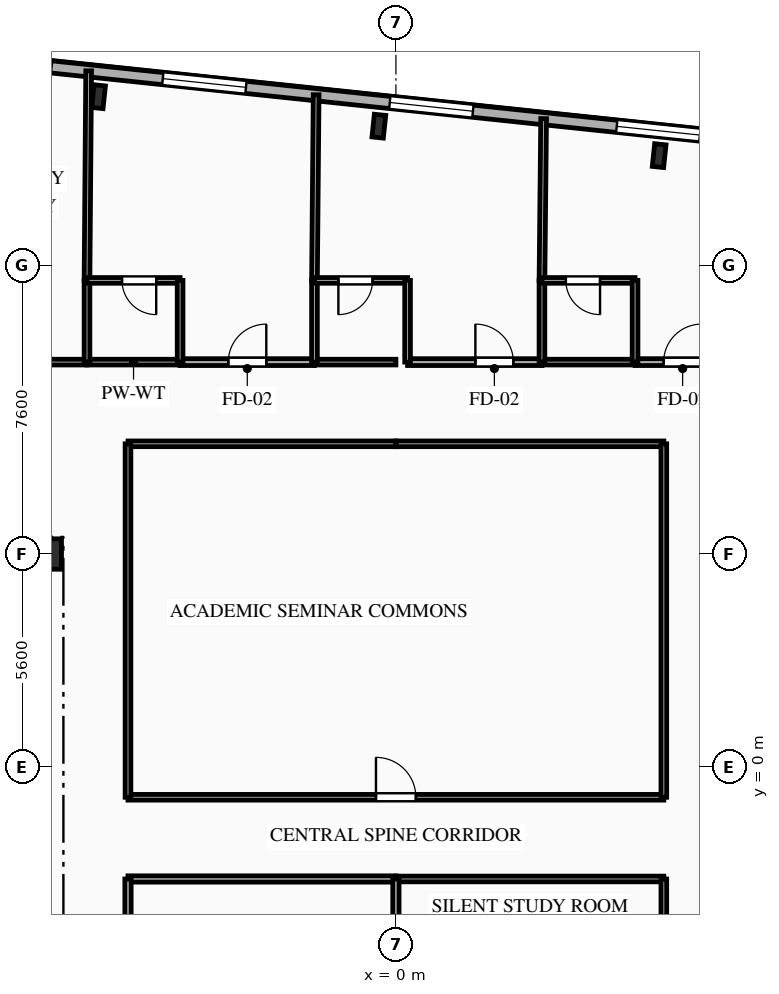
"""IFC4 building model, lengths in metres.
Left out: names, types, materials, properties, quantities, classifications, styles, units other than length and angle.
Written with IfcOpenShell. Run it as: python <this file> out.ifc"""

import sys

from ifc_helpers import new_model, si_unit, direction, frame, frame_2d, origin, origin_2d, place, context, subcontext, project, spatial, rectangle, i_section, extrude, element, fill, save


model = new_model("IFC4")
c1 = context("Model", 3, precision=1e-05, world=origin(), true_north=direction((0.0, 1.0)))
c2 = subcontext(c1, "Body", "Model", "MODEL_VIEW")
j1 = project(units=[si_unit("LENGTHUNIT", "METRE"), si_unit("PLANEANGLEUNIT", "RADIAN")], contexts=[c1])
p1 = place(None, origin())
s1 = spatial("IfcSite", under=j1, at=p1, CompositionType="ELEMENT")
p2 = place(p1, origin())
s2 = spatial("IfcBuilding", under=s1, at=p2, CompositionType="ELEMENT")
p3 = place(p2, frame((0.0, 0.0, 189.7)))
s3 = spatial("IfcBuildingStorey", under=s2, at=p3, CompositionType="ELEMENT", Elevation=189.7)
p4 = place(p3, frame((-9.2, 5.6, 0.0), z_axis=(0.0, 0.0, 1.0), x_axis=(1.0, 0.0, 0.0)))
e1 = element("IfcColumn", 1, at=p4, inside=s3, PredefinedType="COLUMN", context=c2, shape_type="SweptSolid", body=[
    extrude(rectangle(XDim=0.8, YDim=0.8, at=origin_2d()), origin(), (0.0, 0.0, 1.0), 3.35),
])
for number, where, z_axis, x_axis in (
    (2, (6.927, 16.083, 0.0), (0.0, 0.0, 1.0), (0.995, -0.105, 0.0)),
    (3, (-0.449, 16.858, 0.0), (0.0, 0.0, 1.0), (0.995, -0.105, 0.0)),
    (4, (-7.825, 17.634, 0.0), (0.0, 0.0, 1.0), (0.995, -0.105, 0.0)),
):
    element("IfcColumn", number, at=place(p3, frame(where, z_axis=z_axis, x_axis=x_axis)), inside=s3, PredefinedType="COLUMN", context=c2, shape_type="SweptSolid", body=[
        extrude(i_section(OverallWidth=0.3, OverallDepth=0.6, WebThickness=0.015, FlangeThickness=0.03, FilletRadius=0.027, at=origin_2d()), origin(), (0.0, 0.0, 1.0), 3.35),
    ])
p5 = place(p3, frame((-23.156, 19.898, 0.0), z_axis=(0.0, 0.0, 1.0), x_axis=(0.994522001802, -0.104527450613, 0.0)))
e5 = element("IfcWall", 5, at=p5, inside=s3, PredefinedType="SOLIDWALL", context=c2, shape_type="SweptSolid", body=[
    extrude(rectangle(XDim=45.8, YDim=0.32, at=frame_2d((22.9, 0.0))), origin(), (0.0, 0.0, 1.0), 3.04),
])
p6 = place(p5, frame((4.94, 0.0, 0.85)))
e6 = element("IfcOpeningElement", 6, at=p6, cuts=e5, PredefinedType="OPENING", context=c2, shape_type="SweptSolid", body=[
    extrude(rectangle(XDim=1.65, YDim=1.85, at=frame_2d((0.825, 0.925))), frame((0.0, 0.17, 0.0), z_axis=(0.0, -1.0, 0.0), x_axis=(1.0, 0.0, 0.0)), (0.0, 0.0, 1.0), 0.34),
])
p7 = place(p5, frame((12.572, 0.0, 0.85)))
e7 = element("IfcOpeningElement", 7, at=p7, cuts=e5, PredefinedType="OPENING", context=c2, shape_type="SweptSolid", body=[
    extrude(rectangle(XDim=1.6, YDim=1.85, at=frame_2d((0.8, 0.925))), frame((0.0, 0.17, 0.0), z_axis=(0.0, -1.0, 0.0), x_axis=(1.0, 0.0, 0.0)), (0.0, 0.0, 1.0), 0.34),
])
p8 = place(p5, frame((17.116, 0.0, 0.85)))
e8 = element("IfcOpeningElement", 8, at=p8, cuts=e5, PredefinedType="OPENING", context=c2, shape_type="SweptSolid", body=[
    extrude(rectangle(XDim=2.2, YDim=1.85, at=frame_2d((1.1, 0.925))), frame((0.0, 0.17, 0.0), z_axis=(0.0, -1.0, 0.0), x_axis=(1.0, 0.0, 0.0)), (0.0, 0.0, 1.0), 0.34),
])
p9 = place(p5, frame((23.121, 0.0, 0.85)))
e9 = element("IfcOpeningElement", 9, at=p9, cuts=e5, PredefinedType="OPENING", context=c2, shape_type="SweptSolid", body=[
    extrude(rectangle(XDim=2.2, YDim=1.85, at=frame_2d((1.1, 0.925))), frame((0.0, 0.17, 0.0), z_axis=(0.0, -1.0, 0.0), x_axis=(1.0, 0.0, 0.0)), (0.0, 0.0, 1.0), 0.34),
])
p10 = place(p5, frame((29.126, 0.0, 0.85)))
e10 = element("IfcOpeningElement", 10, at=p10, cuts=e5, PredefinedType="OPENING", context=c2, shape_type="SweptSolid", body=[
    extrude(rectangle(XDim=2.2, YDim=1.85, at=frame_2d((1.1, 0.925))), frame((0.0, 0.17, 0.0), z_axis=(0.0, -1.0, 0.0), x_axis=(1.0, 0.0, 0.0)), (0.0, 0.0, 1.0), 0.34),
])
p11 = place(p5, frame((35.172, 0.0, 0.85)))
e11 = element("IfcOpeningElement", 11, at=p11, cuts=e5, PredefinedType="OPENING", context=c2, shape_type="SweptSolid", body=[
    extrude(rectangle(XDim=2.2, YDim=1.85, at=frame_2d((1.1, 0.925))), frame((0.0, 0.17, 0.0), z_axis=(0.0, -1.0, 0.0), x_axis=(1.0, 0.0, 0.0)), (0.0, 0.0, 1.0), 0.34),
])
p12 = place(p5, frame((41.052, 0.0, 0.85)))
e12 = element("IfcOpeningElement", 12, at=p12, cuts=e5, PredefinedType="OPENING", context=c2, shape_type="SweptSolid", body=[
    extrude(rectangle(XDim=1.65, YDim=1.85, at=frame_2d((0.825, 0.925))), frame((0.0, 0.17, 0.0), z_axis=(0.0, -1.0, 0.0), x_axis=(1.0, 0.0, 0.0)), (0.0, 0.0, 1.0), 0.34),
])
p13 = place(p3, frame((-11.764, 10.65, 0.0), z_axis=(0.0, 0.0, 1.0), x_axis=(1.0, 0.0, 0.0)))
e13 = element("IfcWall", 13, at=p13, inside=s3, PredefinedType="PARTITIONING", context=c2, shape_type="SweptSolid", body=[
    extrude(rectangle(XDim=3.635, YDim=0.15, at=frame_2d((1.817, 0.0))), origin(), (0.0, 0.0, 1.0), 3.04),
])
p14 = place(p13, frame((0.771, 0.0, 0.0)))
e14 = element("IfcOpeningElement", 14, at=p14, cuts=e13, PredefinedType="OPENING", context=c2, shape_type="SweptSolid", body=[
    extrude(rectangle(XDim=0.95, YDim=2.1, at=frame_2d((0.475, 1.05))), frame((0.0, 0.085, 0.0), z_axis=(0.0, -1.0, 0.0), x_axis=(1.0, 0.0, 0.0)), (0.0, 0.0, 1.0), 0.17),
])
p15 = place(p3, frame((-5.679, 10.65, 0.0), z_axis=(0.0, 0.0, 1.0), x_axis=(1.0, 0.0, 0.0)))
e15 = element("IfcWall", 15, at=p15, inside=s3, PredefinedType="PARTITIONING", context=c2, shape_type="SweptSolid", body=[
    extrude(rectangle(XDim=3.536, YDim=0.18, at=frame_2d((1.768, 0.0))), origin(), (0.0, 0.0, 1.0), 3.04),
])
p16 = place(p15, frame((1.268, 0.0, 0.0)))
e16 = element("IfcOpeningElement", 16, at=p16, cuts=e15, PredefinedType="OPENING", context=c2, shape_type="SweptSolid", body=[
    extrude(rectangle(XDim=1.0, YDim=2.15, at=frame_2d((0.5, 1.075))), frame((0.0, 0.1, 0.0), z_axis=(0.0, -1.0, 0.0), x_axis=(1.0, 0.0, 0.0)), (0.0, 0.0, 1.0), 0.2),
])
p17 = place(p3, frame((-8.129, 10.65, 0.0), z_axis=(0.0, 0.0, 1.0), x_axis=(1.0, 0.0, 0.0)))
e17 = element("IfcWall", 17, at=p17, inside=s3, PredefinedType="PLUMBINGWALL", context=c2, shape_type="SweptSolid", body=[
    extrude(rectangle(XDim=2.45, YDim=0.15, at=frame_2d((1.225, 0.0))), origin(), (0.0, 0.0, 1.0), 3.04),
])
p18 = place(p3, frame((-2.143, 10.65, 0.0), z_axis=(0.0, 0.0, 1.0), x_axis=(1.0, 0.0, 0.0)))
e18 = element("IfcWall", 18, at=p18, inside=s3, PredefinedType="PLUMBINGWALL", context=c2, shape_type="SweptSolid", body=[
    extrude(rectangle(XDim=2.143, YDim=0.15, at=frame_2d((1.072, 0.0))), origin(), (0.0, 0.0, 1.0), 3.04),
])
p19 = place(p3, frame((0.0, 8.5, 0.0), z_axis=(0.0, 0.0, 1.0), x_axis=(-1.0, 0.0, 0.0)))
e19 = element("IfcWall", 19, at=p19, inside=s3, PredefinedType="PARTITIONING", context=c2, shape_type="SweptSolid", body=[
    extrude(rectangle(XDim=7.05, YDim=0.15, at=frame_2d((3.525, 0.0))), origin(), (0.0, 0.0, 1.0), 3.04),
])
p20 = place(p3, frame((0.307, 10.65, 0.0), z_axis=(0.0, 0.0, 1.0), x_axis=(1.0, 0.0, 0.0)))
e20 = element("IfcWall", 20, at=p20, inside=s3, PredefinedType="PARTITIONING", context=c2, shape_type="SweptSolid", body=[
    extrude(rectangle(XDim=3.536, YDim=0.18, at=frame_2d((1.768, 0.0))), origin(), (0.0, 0.0, 1.0), 3.04),
])
p21 = place(p20, frame((1.784, 0.0, 0.0)))
e21 = element("IfcOpeningElement", 21, at=p21, cuts=e20, PredefinedType="OPENING", context=c2, shape_type="SweptSolid", body=[
    extrude(rectangle(XDim=1.0, YDim=2.15, at=frame_2d((0.5, 1.075))), frame((0.0, 0.1, 0.0), z_axis=(0.0, -1.0, 0.0), x_axis=(1.0, 0.0, 0.0)), (0.0, 0.0, 1.0), 0.2),
])
p22 = place(p3, frame((6.293, 10.65, 0.0), z_axis=(0.0, 0.0, 1.0), x_axis=(1.0, 0.0, 0.0)))
e22 = element("IfcWall", 22, at=p22, inside=s3, PredefinedType="PARTITIONING", context=c2, shape_type="SweptSolid", body=[
    extrude(rectangle(XDim=3.536, YDim=0.18, at=frame_2d((1.768, 0.0))), origin(), (0.0, 0.0, 1.0), 3.04),
])
p23 = place(p22, frame((0.752, 0.0, 0.0)))
e23 = element("IfcOpeningElement", 23, at=p23, cuts=e22, PredefinedType="OPENING", context=c2, shape_type="SweptSolid", body=[
    extrude(rectangle(XDim=1.0, YDim=2.15, at=frame_2d((0.5, 1.075))), frame((0.0, 0.1, 0.0), z_axis=(0.0, -1.0, 0.0), x_axis=(1.0, 0.0, 0.0)), (0.0, 0.0, 1.0), 0.2),
])
p24 = place(p3, frame((3.843, 10.65, 0.0), z_axis=(0.0, 0.0, 1.0), x_axis=(1.0, 0.0, 0.0)))
e24 = element("IfcWall", 24, at=p24, inside=s3, PredefinedType="PLUMBINGWALL", context=c2, shape_type="SweptSolid", body=[
    extrude(rectangle(XDim=2.45, YDim=0.15, at=frame_2d((1.225, 0.0))), origin(), (0.0, 0.0, 1.0), 3.04),
])
p25 = place(p3, frame((7.05, 8.5, 0.0), z_axis=(0.0, 0.0, 1.0), x_axis=(-1.0, 0.0, 0.0)))
e25 = element("IfcWall", 25, at=p25, inside=s3, PredefinedType="PARTITIONING", context=c2, shape_type="SweptSolid", body=[
    extrude(rectangle(XDim=7.05, YDim=0.15, at=frame_2d((3.525, 0.0))), origin(), (0.0, 0.0, 1.0), 3.04),
])
p26 = place(p3, frame((-7.05, -0.8, 0.0), z_axis=(0.0, 0.0, 1.0), x_axis=(1.0, 0.0, 0.0)))
e26 = element("IfcWall", 26, at=p26, inside=s3, PredefinedType="PARTITIONING", context=c2, shape_type="SweptSolid", body=[
    extrude(rectangle(XDim=14.1, YDim=0.15, at=frame_2d((7.05, 0.0))), origin(), (0.0, 0.0, 1.0), 3.04),
])
p27 = place(p26, frame((6.525, 0.0, 0.0)))
e27 = element("IfcOpeningElement", 27, at=p27, cuts=e26, PredefinedType="OPENING", context=c2, shape_type="SweptSolid", body=[
    extrude(rectangle(XDim=1.05, YDim=2.15, at=frame_2d((0.525, 1.075))), frame((0.0, 0.085, 0.0), z_axis=(0.0, -1.0, 0.0), x_axis=(1.0, 0.0, 0.0)), (0.0, 0.0, 1.0), 0.17),
])
p28 = place(p3, frame((0.0, -2.95, 0.0), z_axis=(0.0, 0.0, 1.0), x_axis=(-1.0, 0.0, 0.0)))
e28 = element("IfcWall", 28, at=p28, inside=s3, PredefinedType="PARTITIONING", context=c2, shape_type="SweptSolid", body=[
    extrude(rectangle(XDim=7.05, YDim=0.165, at=frame_2d((3.525, 0.0))), origin(), (0.0, 0.0, 1.0), 3.04),
])
p29 = place(p3, frame((7.05, -2.95, 0.0), z_axis=(0.0, 0.0, 1.0), x_axis=(-1.0, 0.0, 0.0)))
e29 = element("IfcWall", 29, at=p29, inside=s3, PredefinedType="PARTITIONING", context=c2, shape_type="SweptSolid", body=[
    extrude(rectangle(XDim=7.05, YDim=0.15, at=frame_2d((3.525, 0.0))), origin(), (0.0, 0.0, 1.0), 3.04),
])
p30 = place(p3, frame((-7.05, 8.5, 0.0), z_axis=(0.0, 0.0, 1.0), x_axis=(0.0, -1.0, 0.0)))
e30 = element("IfcWall", 30, at=p30, inside=s3, PredefinedType="PARTITIONING", context=c2, shape_type="SweptSolid", body=[
    extrude(rectangle(XDim=9.3, YDim=0.15, at=frame_2d((4.65, 0.0))), origin(), (0.0, 0.0, 1.0), 3.04),
])
p31 = place(p3, frame((-7.05, -2.95, 0.0), z_axis=(0.0, 0.0, 1.0), x_axis=(0.0, -1.0, 0.0)))
e31 = element("IfcWall", 31, at=p31, inside=s3, PredefinedType="PARTITIONING", context=c2, shape_type="SweptSolid", body=[
    extrude(rectangle(XDim=2.65, YDim=0.165, at=frame_2d((1.325, 0.0))), origin(), (0.0, 0.0, 1.0), 3.04),
])
p32 = place(p3, frame((7.05, -0.8, 0.0), z_axis=(0.0, 0.0, 1.0), x_axis=(0.0, 1.0, 0.0)))
e32 = element("IfcWall", 32, at=p32, inside=s3, PredefinedType="PARTITIONING", context=c2, shape_type="SweptSolid", body=[
    extrude(rectangle(XDim=9.3, YDim=0.15, at=frame_2d((4.65, 0.0))), origin(), (0.0, 0.0, 1.0), 3.04),
])
p33 = place(p3, frame((7.05, -5.6, 0.0), z_axis=(0.0, 0.0, 1.0), x_axis=(0.0, 1.0, 0.0)))
e33 = element("IfcWall", 33, at=p33, inside=s3, PredefinedType="PARTITIONING", context=c2, shape_type="SweptSolid", body=[
    extrude(rectangle(XDim=2.65, YDim=0.15, at=frame_2d((1.325, 0.0))), origin(), (0.0, 0.0, 1.0), 3.04),
])
p34 = place(p3, frame((-8.085, 18.314, 0.0), z_axis=(0.0, 0.0, 1.0), x_axis=(-0.007924663713, -0.99996859936, 0.0)))
e34 = element("IfcWall", 34, at=p34, inside=s3, PredefinedType="PARTITIONING", context=c2, shape_type="SweptSolid", body=[
    extrude(rectangle(XDim=5.515, YDim=0.15, at=frame_2d((2.757, 0.0))), origin(), (0.0, 0.0, 1.0), 2.665),
])
p35 = place(p3, frame((-8.129, 12.8, 0.0), z_axis=(0.0, 0.0, 1.0), x_axis=(0.0, -1.0, 0.0)))
e35 = element("IfcWall", 35, at=p35, inside=s3, PredefinedType="PLUMBINGWALL", context=c2, shape_type="SweptSolid", body=[
    extrude(rectangle(XDim=2.15, YDim=0.15, at=frame_2d((1.075, 0.0))), origin(), (0.0, 0.0, 1.0), 3.04),
])
p36 = place(p3, frame((-5.679, 12.8, 0.0), z_axis=(0.0, 0.0, 1.0), x_axis=(-1.0, 0.0, 0.0)))
e36 = element("IfcWall", 36, at=p36, inside=s3, PredefinedType="PLUMBINGWALL", context=c2, shape_type="SweptSolid", body=[
    extrude(rectangle(XDim=2.45, YDim=0.15, at=frame_2d((1.225, 0.0))), origin(), (0.0, 0.0, 1.0), 3.04),
])
p37 = place(p36, frame((0.629, 0.0, 0.0)))
e37 = element("IfcOpeningElement", 37, at=p37, cuts=e36, PredefinedType="OPENING", context=c2, shape_type="SweptSolid", body=[
    extrude(rectangle(XDim=0.9, YDim=2.1, at=frame_2d((0.45, 1.05))), frame((0.0, 0.085, 0.0), z_axis=(0.0, -1.0, 0.0), x_axis=(1.0, 0.0, 0.0)), (0.0, 0.0, 1.0), 0.17),
])
p38 = place(p3, frame((-5.679, 10.65, 0.0), z_axis=(0.0, 0.0, 1.0), x_axis=(0.0, 1.0, 0.0)))
e38 = element("IfcWall", 38, at=p38, inside=s3, PredefinedType="PLUMBINGWALL", context=c2, shape_type="SweptSolid", body=[
    extrude(rectangle(XDim=2.15, YDim=0.15, at=frame_2d((1.075, 0.0))), origin(), (0.0, 0.0, 1.0), 3.04),
])
p39 = place(p3, frame((-2.099, 17.685, 0.0), z_axis=(0.0, 0.0, 1.0), x_axis=(-0.008995138317, -0.999959542925, 0.0)))
e39 = element("IfcWall", 39, at=p39, inside=s3, PredefinedType="PARTITIONING", context=c2, shape_type="SweptSolid", body=[
    extrude(rectangle(XDim=4.885, YDim=0.15, at=frame_2d((2.443, 0.0))), origin(), (0.0, 0.0, 1.0), 3.04),
])
p40 = place(p3, frame((-2.143, 12.8, 0.0), z_axis=(0.0, 0.0, 1.0), x_axis=(0.0, -1.0, 0.0)))
e40 = element("IfcWall", 40, at=p40, inside=s3, PredefinedType="PLUMBINGWALL", context=c2, shape_type="SweptSolid", body=[
    extrude(rectangle(XDim=2.15, YDim=0.15, at=frame_2d((1.075, 0.0))), origin(), (0.0, 0.0, 1.0), 3.04),
])
p41 = place(p3, frame((0.307, 12.8, 0.0), z_axis=(0.0, 0.0, 1.0), x_axis=(-1.0, 0.0, 0.0)))
e41 = element("IfcWall", 41, at=p41, inside=s3, PredefinedType="PLUMBINGWALL", context=c2, shape_type="SweptSolid", body=[
    extrude(rectangle(XDim=2.45, YDim=0.15, at=frame_2d((1.225, 0.0))), origin(), (0.0, 0.0, 1.0), 3.04),
])
p42 = place(p41, frame((0.921, 0.0, 0.0)))
e42 = element("IfcOpeningElement", 42, at=p42, cuts=e41, PredefinedType="OPENING", context=c2, shape_type="SweptSolid", body=[
    extrude(rectangle(XDim=0.9, YDim=2.1, at=frame_2d((0.45, 1.05))), frame((0.0, 0.085, 0.0), z_axis=(0.0, -1.0, 0.0), x_axis=(1.0, 0.0, 0.0)), (0.0, 0.0, 1.0), 0.17),
])
p43 = place(p3, frame((0.307, 10.65, 0.0), z_axis=(0.0, 0.0, 1.0), x_axis=(0.0, 1.0, 0.0)))
e43 = element("IfcWall", 43, at=p43, inside=s3, PredefinedType="PLUMBINGWALL", context=c2, shape_type="SweptSolid", body=[
    extrude(rectangle(XDim=2.15, YDim=0.15, at=frame_2d((1.075, 0.0))), origin(), (0.0, 0.0, 1.0), 3.04),
])
p44 = place(p3, frame((3.887, 17.056, 0.0), z_axis=(0.0, 0.0, 1.0), x_axis=(-0.010324694878, -0.999946698917, 0.0)))
e44 = element("IfcWall", 44, at=p44, inside=s3, PredefinedType="PARTITIONING", context=c2, shape_type="SweptSolid", body=[
    extrude(rectangle(XDim=4.256, YDim=0.15, at=frame_2d((2.128, 0.0))), origin(), (0.0, 0.0, 1.0), 3.04),
])
p45 = place(p3, frame((3.843, 12.8, 0.0), z_axis=(0.0, 0.0, 1.0), x_axis=(0.0, -1.0, 0.0)))
e45 = element("IfcWall", 45, at=p45, inside=s3, PredefinedType="PLUMBINGWALL", context=c2, shape_type="SweptSolid", body=[
    extrude(rectangle(XDim=2.15, YDim=0.15, at=frame_2d((1.075, 0.0))), origin(), (0.0, 0.0, 1.0), 3.04),
])
p46 = place(p3, frame((6.293, 12.8, 0.0), z_axis=(0.0, 0.0, 1.0), x_axis=(-1.0, 0.0, 0.0)))
e46 = element("IfcWall", 46, at=p46, inside=s3, PredefinedType="PLUMBINGWALL", context=c2, shape_type="SweptSolid", body=[
    extrude(rectangle(XDim=2.45, YDim=0.15, at=frame_2d((1.225, 0.0))), origin(), (0.0, 0.0, 1.0), 3.04),
])
p47 = place(p46, frame((0.921, 0.0, 0.0)))
e47 = element("IfcOpeningElement", 47, at=p47, cuts=e46, PredefinedType="OPENING", context=c2, shape_type="SweptSolid", body=[
    extrude(rectangle(XDim=0.9, YDim=2.1, at=frame_2d((0.45, 1.05))), frame((0.0, 0.085, 0.0), z_axis=(0.0, -1.0, 0.0), x_axis=(1.0, 0.0, 0.0)), (0.0, 0.0, 1.0), 0.17),
])
p48 = place(p3, frame((6.293, 10.65, 0.0), z_axis=(0.0, 0.0, 1.0), x_axis=(0.0, 1.0, 0.0)))
e48 = element("IfcWall", 48, at=p48, inside=s3, PredefinedType="PLUMBINGWALL", context=c2, shape_type="SweptSolid", body=[
    extrude(rectangle(XDim=2.15, YDim=0.15, at=frame_2d((1.075, 0.0))), origin(), (0.0, 0.0, 1.0), 3.04),
])
p49 = place(p3, frame((0.0, -2.95, 0.0), z_axis=(0.0, 0.0, 1.0), x_axis=(0.0, -1.0, 0.0)))
e49 = element("IfcWall", 49, at=p49, inside=s3, PredefinedType="PARTITIONING", context=c2, shape_type="SweptSolid", body=[
    extrude(rectangle(XDim=2.65, YDim=0.165, at=frame_2d((1.325, 0.0))), origin(), (0.0, 0.0, 1.0), 3.04),
])
p50 = place(p8, origin())
e50 = element("IfcWindow", 50, at=p50, inside=s3, PartitioningType="SINGLE_PANEL", PredefinedType="WINDOW", context=c2, shape_type="SweptSolid", body=[
    extrude(rectangle(XDim=2.2, YDim=1.85, at=frame_2d((1.1, 0.925))), frame((0.0, 0.03, 0.0), z_axis=(0.0, -1.0, 0.0), x_axis=(1.0, 0.0, 0.0)), (0.0, 0.0, 1.0), 0.06),
])
fill(e8, e50)
p51 = place(p9, origin())
e51 = element("IfcWindow", 51, at=p51, inside=s3, PartitioningType="SINGLE_PANEL", PredefinedType="WINDOW", context=c2, shape_type="SweptSolid", body=[
    extrude(rectangle(XDim=2.2, YDim=1.85, at=frame_2d((1.1, 0.925))), frame((0.0, 0.03, 0.0), z_axis=(0.0, -1.0, 0.0), x_axis=(1.0, 0.0, 0.0)), (0.0, 0.0, 1.0), 0.06),
])
fill(e9, e51)
p52 = place(p10, origin())
e52 = element("IfcWindow", 52, at=p52, inside=s3, PartitioningType="SINGLE_PANEL", PredefinedType="WINDOW", context=c2, shape_type="SweptSolid", body=[
    extrude(rectangle(XDim=2.2, YDim=1.85, at=frame_2d((1.1, 0.925))), frame((0.0, 0.03, 0.0), z_axis=(0.0, -1.0, 0.0), x_axis=(1.0, 0.0, 0.0)), (0.0, 0.0, 1.0), 0.06),
])
fill(e10, e52)
p53 = place(p16, origin())
e53 = element("IfcDoor", 53, at=p53, inside=s3, OperationType="SINGLE_SWING_RIGHT", PredefinedType="DOOR", context=c2, shape_type="SweptSolid", body=[
    extrude(rectangle(XDim=1.0, YDim=2.15, at=frame_2d((0.5, 1.075))), frame((0.0, 0.025, 0.0), z_axis=(0.0, -1.0, 0.0), x_axis=(1.0, 0.0, 0.0)), (0.0, 0.0, 1.0), 0.05),
])
fill(e16, e53)
p54 = place(p21, origin())
e54 = element("IfcDoor", 54, at=p54, inside=s3, OperationType="SINGLE_SWING_LEFT", PredefinedType="DOOR", context=c2, shape_type="SweptSolid", body=[
    extrude(rectangle(XDim=1.0, YDim=2.15, at=frame_2d((0.5, 1.075))), frame((0.0, 0.025, 0.0), z_axis=(0.0, -1.0, 0.0), x_axis=(1.0, 0.0, 0.0)), (0.0, 0.0, 1.0), 0.05),
])
fill(e21, e54)
p55 = place(p23, origin())
e55 = element("IfcDoor", 55, at=p55, inside=s3, OperationType="SINGLE_SWING_RIGHT", PredefinedType="DOOR", context=c2, shape_type="SweptSolid", body=[
    extrude(rectangle(XDim=1.0, YDim=2.15, at=frame_2d((0.5, 1.075))), frame((0.0, 0.025, 0.0), z_axis=(0.0, -1.0, 0.0), x_axis=(1.0, 0.0, 0.0)), (0.0, 0.0, 1.0), 0.05),
])
fill(e23, e55)
p56 = place(p27, origin())
e56 = element("IfcDoor", 56, at=p56, inside=s3, OperationType="SINGLE_SWING_LEFT", PredefinedType="DOOR", context=c2, shape_type="SweptSolid", body=[
    extrude(rectangle(XDim=1.05, YDim=2.15, at=frame_2d((0.525, 1.075))), frame((0.0, 0.025, 0.0), z_axis=(0.0, -1.0, 0.0), x_axis=(1.0, 0.0, 0.0)), (0.0, 0.0, 1.0), 0.05),
])
fill(e27, e56)
p57 = place(p37, origin())
e57 = element("IfcDoor", 57, at=p57, inside=s3, OperationType="SINGLE_SWING_LEFT", PredefinedType="DOOR", context=c2, shape_type="SweptSolid", body=[
    extrude(rectangle(XDim=0.9, YDim=2.1, at=frame_2d((0.45, 1.05))), frame((0.0, 0.025, 0.0), z_axis=(0.0, -1.0, 0.0), x_axis=(1.0, 0.0, 0.0)), (0.0, 0.0, 1.0), 0.05),
])
fill(e37, e57)
p58 = place(p42, origin())
e58 = element("IfcDoor", 58, at=p58, inside=s3, OperationType="SINGLE_SWING_RIGHT", PredefinedType="DOOR", context=c2, shape_type="SweptSolid", body=[
    extrude(rectangle(XDim=0.9, YDim=2.1, at=frame_2d((0.45, 1.05))), frame((0.0, 0.025, 0.0), z_axis=(0.0, -1.0, 0.0), x_axis=(1.0, 0.0, 0.0)), (0.0, 0.0, 1.0), 0.05),
])
fill(e42, e58)
p59 = place(p47, origin())
e59 = element("IfcDoor", 59, at=p59, inside=s3, OperationType="SINGLE_SWING_LEFT", PredefinedType="DOOR", context=c2, shape_type="SweptSolid", body=[
    extrude(rectangle(XDim=0.9, YDim=2.1, at=frame_2d((0.45, 1.05))), frame((0.0, 0.025, 0.0), z_axis=(0.0, -1.0, 0.0), x_axis=(1.0, 0.0, 0.0)), (0.0, 0.0, 1.0), 0.05),
])
fill(e47, e59)
save(model, sys.argv[1])
